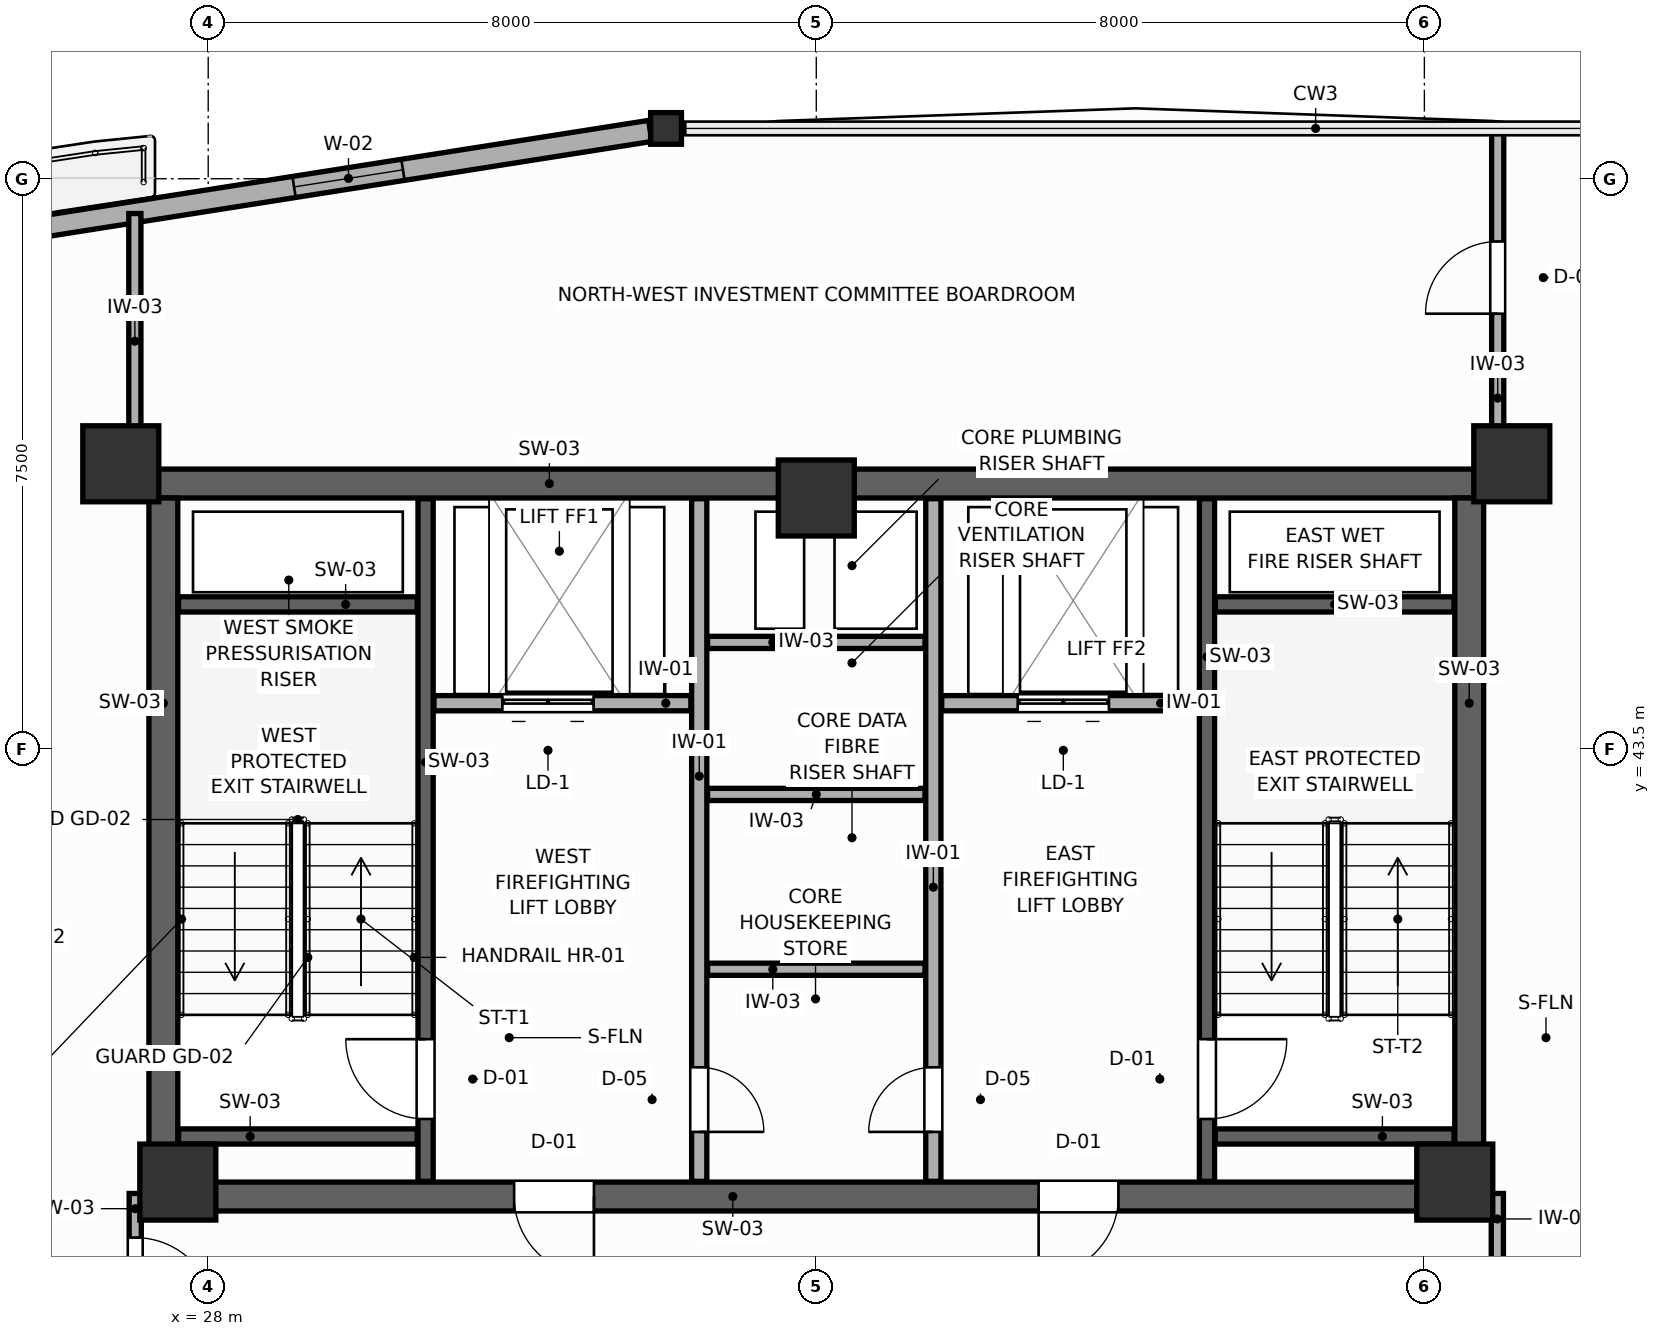
"""IFC4 building model, lengths in metres.
Left out: names, types, materials, properties, quantities, classifications, styles, units other than length and angle.
Written with IfcOpenShell. Run it as: python <this file> out.ifc"""

import sys

from ifc_helpers import new_model, si_unit, direction, frame, frame_2d, origin, origin_2d, place, context, subcontext, project, spatial, rectangle, i_section, extrude, source, transform, mapped, element, fill, save


model = new_model("IFC4")
c1 = context("Model", 3, precision=1e-05, world=origin(), true_north=direction((0.0, 1.0)))
c2 = subcontext(c1, "Body", "Model", "MODEL_VIEW")
j1 = project(units=[si_unit("LENGTHUNIT", "METRE"), si_unit("PLANEANGLEUNIT", "RADIAN")], contexts=[c1])
p1 = place(None, origin())
s1 = spatial("IfcSite", under=j1, at=p1, CompositionType="ELEMENT")
p2 = place(p1, origin())
s2 = spatial("IfcBuilding", under=s1, at=p2, CompositionType="ELEMENT")
p3 = place(p2, frame((0.0, 0.0, 205.8)))
s3 = spatial("IfcBuildingStorey", under=s2, at=p3, CompositionType="ELEMENT", Elevation=205.8)
p4 = place(p3, frame((27.22, 46.99, 0.0), z_axis=(0.0, 0.0, 1.0), x_axis=(1.0, 0.0, 0.0)))
e1 = element("IfcWall", 1, at=p4, inside=s3, PredefinedType="SHEAR", context=c2, shape_type="SweptSolid", body=[
    extrude(rectangle(XDim=17.56, YDim=0.38, at=frame_2d((8.78, 0.0))), origin(), (0.0, 0.0, 1.0), 3.6),
])
p5 = place(p3, frame((27.22, 37.61, 0.0), z_axis=(0.0, 0.0, 1.0), x_axis=(1.0, 0.0, 0.0)))
e2 = element("IfcWall", 2, at=p5, inside=s3, PredefinedType="SHEAR", context=c2, shape_type="SweptSolid", body=[
    extrude(rectangle(XDim=17.56, YDim=0.38, at=frame_2d((8.78, 0.0))), origin(), (0.0, 0.0, 1.0), 3.6),
])
p6 = place(p5, frame((4.805, 0.0, 0.0)))
e3 = element("IfcOpeningElement", 3, at=p6, cuts=e2, PredefinedType="OPENING", context=c2, shape_type="SweptSolid", body=[
    extrude(rectangle(XDim=1.05, YDim=2.1, at=frame_2d((0.525, 1.05))), frame((0.0, 0.2, 0.0), z_axis=(0.0, -1.0, 0.0), x_axis=(1.0, 0.0, 0.0)), (0.0, 0.0, 1.0), 0.4),
])
p7 = place(p5, frame((11.705, 0.0, 0.0)))
e4 = element("IfcOpeningElement", 4, at=p7, cuts=e2, PredefinedType="OPENING", context=c2, shape_type="SweptSolid", body=[
    extrude(rectangle(XDim=1.05, YDim=2.1, at=frame_2d((0.525, 1.05))), frame((0.0, 0.2, 0.0), z_axis=(0.0, -1.0, 0.0), x_axis=(1.0, 0.0, 0.0)), (0.0, 0.0, 1.0), 0.4),
])
for number, where, z_axis, x_axis in (
    (5, (27.41, 37.8, 0.0), (0.0, 0.0, 1.0), (0.0, 1.0, 0.0)),
    (6, (44.59, 37.8, 0.0), (0.0, 0.0, 1.0), (0.0, 1.0, 0.0)),
):
    element("IfcWall", number, at=place(p3, frame(where, z_axis=z_axis, x_axis=x_axis)), inside=s3, PredefinedType="SHEAR", context=c2, shape_type="SweptSolid", body=[
        extrude(rectangle(XDim=9.0, YDim=0.38, at=frame_2d((4.5, 0.0))), origin(), (0.0, 0.0, 1.0), 3.6),
    ])
m1 = source(origin(), c2, "Body", "SweptSolid", [
    extrude(rectangle(XDim=1.0, YDim=1.0, at=origin_2d()), origin(), (0.0, 0.0, 1.0), 3.6),
])
for number, where, z_axis, x_axis in (
    (7, (26.85, 47.25, 0.0), (0.0, 0.0, 1.0), (1.0, 0.0, 0.0)),
    (8, (45.15, 47.25, 0.0), (0.0, 0.0, 1.0), (1.0, 0.0, 0.0)),
    (9, (27.6, 37.8, 0.0), (0.0, 0.0, 1.0), (1.0, 0.0, 0.0)),
    (10, (44.4, 37.8, 0.0), (0.0, 0.0, 1.0), (1.0, 0.0, 0.0)),
    (11, (36.0, 46.8, 0.0), (0.0, 0.0, 1.0), (1.0, 0.0, 0.0)),
):
    element("IfcColumn", number, at=place(p3, frame(where, z_axis=z_axis, x_axis=x_axis)), inside=s3, PredefinedType="COLUMN", context=c2, shape_type="MappedRepresentation", body=[
        mapped(m1, transform((0.0, 0.0, 0.0), scale=1.0)),
    ])
m2 = source(origin(), c2, "Body", "SweptSolid", [
    extrude(i_section(OverallWidth=0.406, OverallDepth=0.416, WebThickness=0.027, FlangeThickness=0.044, FilletRadius=0.015, at=origin_2d()), origin(), (0.0, 0.0, 1.0), 3.6),
])
p8 = place(p3, frame((34.023, 51.662, 0.0), z_axis=(0.0, 0.0, 1.0), x_axis=(1.0, 0.0, 0.0)))
e12 = element("IfcColumn", 12, at=p8, inside=s3, PredefinedType="COLUMN", context=c2, shape_type="MappedRepresentation", body=[
    mapped(m2, transform((0.0, 0.0, 0.0), scale=1.0)),
])
p9 = place(p3, frame((33.815, 51.629, 0.0), z_axis=(0.0, 0.0, 1.0), x_axis=(-0.987848165878, -0.155422009936, 0.0)))
e13 = element("IfcWall", 13, at=p9, inside=s3, PredefinedType="SOLIDWALL", context=c2, shape_type="SweptSolid", body=[
    extrude(rectangle(XDim=13.823, YDim=0.28, at=frame_2d((6.912, 0.0))), origin(), (0.0, 0.0, 1.0), 2.96),
])
p10 = place(p9, frame((3.293, 0.0, 0.75)))
e14 = element("IfcOpeningElement", 14, at=p10, cuts=e13, PredefinedType="OPENING", context=c2, shape_type="SweptSolid", body=[
    extrude(rectangle(XDim=1.45, YDim=1.65, at=frame_2d((0.725, 0.825))), frame((0.0, 0.15, 0.0), z_axis=(0.0, -1.0, 0.0), x_axis=(1.0, 0.0, 0.0)), (0.0, 0.0, 1.0), 0.3),
])
p11 = place(p3, frame((30.86, 37.81, 0.0), z_axis=(0.0, 0.0, 1.0), x_axis=(0.0, 1.0, 0.0)))
e15 = element("IfcWall", 15, at=p11, inside=s3, PredefinedType="SHEAR", context=c2, shape_type="SweptSolid", body=[
    extrude(rectangle(XDim=8.98, YDim=0.2, at=frame_2d((4.49, 0.0))), origin(), (0.0, 0.0, 1.0), 3.6),
])
p12 = place(p11, frame((0.82, 0.0, 0.0)))
e16 = element("IfcOpeningElement", 16, at=p12, cuts=e15, PredefinedType="OPENING", context=c2, shape_type="SweptSolid", body=[
    extrude(rectangle(XDim=1.05, YDim=2.1, at=frame_2d((0.525, 1.05))), frame((0.0, 0.11, 0.0), z_axis=(0.0, -1.0, 0.0), x_axis=(1.0, 0.0, 0.0)), (0.0, 0.0, 1.0), 0.22),
])
for number, where, z_axis, x_axis in (
    (17, (27.61, 45.4, 0.0), (0.0, 0.0, 1.0), (1.0, 0.0, 0.0)),
    (18, (27.61, 38.4, 0.0), (0.0, 0.0, 1.0), (1.0, 0.0, 0.0)),
):
    element("IfcWall", number, at=place(p3, frame(where, z_axis=z_axis, x_axis=x_axis)), inside=s3, PredefinedType="SHEAR", context=c2, shape_type="SweptSolid", body=[
        extrude(rectangle(XDim=3.14, YDim=0.2, at=frame_2d((1.57, 0.0))), origin(), (0.0, 0.0, 1.0), 3.6),
    ])
p13 = place(p3, frame((41.14, 37.81, 0.0), z_axis=(0.0, 0.0, 1.0), x_axis=(0.0, 1.0, 0.0)))
e19 = element("IfcWall", 19, at=p13, inside=s3, PredefinedType="SHEAR", context=c2, shape_type="SweptSolid", body=[
    extrude(rectangle(XDim=8.98, YDim=0.2, at=frame_2d((4.49, 0.0))), origin(), (0.0, 0.0, 1.0), 3.6),
])
p14 = place(p13, frame((0.82, 0.0, 0.0)))
e20 = element("IfcOpeningElement", 20, at=p14, cuts=e19, PredefinedType="OPENING", context=c2, shape_type="SweptSolid", body=[
    extrude(rectangle(XDim=1.05, YDim=2.1, at=frame_2d((0.525, 1.05))), frame((0.0, 0.11, 0.0), z_axis=(0.0, -1.0, 0.0), x_axis=(1.0, 0.0, 0.0)), (0.0, 0.0, 1.0), 0.22),
])
for number, where, z_axis, x_axis in (
    (21, (41.25, 45.4, 0.0), (0.0, 0.0, 1.0), (1.0, 0.0, 0.0)),
    (22, (41.25, 38.4, 0.0), (0.0, 0.0, 1.0), (1.0, 0.0, 0.0)),
):
    element("IfcWall", number, at=place(p3, frame(where, z_axis=z_axis, x_axis=x_axis)), inside=s3, PredefinedType="SHEAR", context=c2, shape_type="SweptSolid", body=[
        extrude(rectangle(XDim=3.14, YDim=0.2, at=frame_2d((1.57, 0.0))), origin(), (0.0, 0.0, 1.0), 3.6),
    ])
p15 = place(p3, frame((30.97, 44.1, 0.0), z_axis=(0.0, 0.0, 1.0), x_axis=(1.0, 0.0, 0.0)))
e23 = element("IfcWall", 23, at=p15, inside=s3, PredefinedType="PARTITIONING", context=c2, shape_type="SweptSolid", body=[
    extrude(rectangle(XDim=3.38, YDim=0.2, at=frame_2d((1.69, 0.0))), origin(), (0.0, 0.0, 1.0), 3.41),
])
p16 = place(p15, frame((0.9, 0.0, 0.0)))
e24 = element("IfcOpeningElement", 24, at=p16, cuts=e23, PredefinedType="OPENING", context=c2, shape_type="SweptSolid", body=[
    extrude(rectangle(XDim=1.2, YDim=2.1, at=frame_2d((0.6, 1.05))), frame((0.0, 0.11, 0.0), z_axis=(0.0, -1.0, 0.0), x_axis=(1.0, 0.0, 0.0)), (0.0, 0.0, 1.0), 0.22),
])
p17 = place(p3, frame((37.65, 44.1, 0.0), z_axis=(0.0, 0.0, 1.0), x_axis=(1.0, 0.0, 0.0)))
e25 = element("IfcWall", 25, at=p17, inside=s3, PredefinedType="PARTITIONING", context=c2, shape_type="SweptSolid", body=[
    extrude(rectangle(XDim=3.38, YDim=0.2, at=frame_2d((1.69, 0.0))), origin(), (0.0, 0.0, 1.0), 3.41),
])
p18 = place(p17, frame((1.0, 0.0, 0.0)))
e26 = element("IfcOpeningElement", 26, at=p18, cuts=e25, PredefinedType="OPENING", context=c2, shape_type="SweptSolid", body=[
    extrude(rectangle(XDim=1.2, YDim=2.1, at=frame_2d((0.6, 1.05))), frame((0.0, 0.11, 0.0), z_axis=(0.0, -1.0, 0.0), x_axis=(1.0, 0.0, 0.0)), (0.0, 0.0, 1.0), 0.22),
])
p19 = place(p3, frame((34.46, 37.81, 0.0), z_axis=(0.0, 0.0, 1.0), x_axis=(0.0, 1.0, 0.0)))
e27 = element("IfcWall", 27, at=p19, inside=s3, PredefinedType="PARTITIONING", context=c2, shape_type="SweptSolid", body=[
    extrude(rectangle(XDim=8.98, YDim=0.2, at=frame_2d((4.49, 0.0))), origin(), (0.0, 0.0, 1.0), 3.41),
])
p20 = place(p19, frame((0.65, 0.0, 0.0)))
e28 = element("IfcOpeningElement", 28, at=p20, cuts=e27, PredefinedType="OPENING", context=c2, shape_type="SweptSolid", body=[
    extrude(rectangle(XDim=0.85, YDim=2.05, at=frame_2d((0.425, 1.025))), frame((0.0, 0.11, 0.0), z_axis=(0.0, -1.0, 0.0), x_axis=(1.0, 0.0, 0.0)), (0.0, 0.0, 1.0), 0.22),
])
p21 = place(p3, frame((37.54, 37.81, 0.0), z_axis=(0.0, 0.0, 1.0), x_axis=(0.0, 1.0, 0.0)))
e29 = element("IfcWall", 29, at=p21, inside=s3, PredefinedType="PARTITIONING", context=c2, shape_type="SweptSolid", body=[
    extrude(rectangle(XDim=8.98, YDim=0.2, at=frame_2d((4.49, 0.0))), origin(), (0.0, 0.0, 1.0), 3.41),
])
p22 = place(p21, frame((0.65, 0.0, 0.0)))
e30 = element("IfcOpeningElement", 30, at=p22, cuts=e29, PredefinedType="OPENING", context=c2, shape_type="SweptSolid", body=[
    extrude(rectangle(XDim=0.85, YDim=2.05, at=frame_2d((0.425, 1.025))), frame((0.0, 0.11, 0.0), z_axis=(0.0, -1.0, 0.0), x_axis=(1.0, 0.0, 0.0)), (0.0, 0.0, 1.0), 0.22),
])
for number, where, z_axis, x_axis in (
    (31, (34.57, 40.6, 0.0), (0.0, 0.0, 1.0), (1.0, 0.0, 0.0)),
    (32, (34.57, 42.9, 0.0), (0.0, 0.0, 1.0), (1.0, 0.0, 0.0)),
    (33, (34.57, 44.9, 0.0), (0.0, 0.0, 1.0), (1.0, 0.0, 0.0)),
):
    element("IfcWall", number, at=place(p3, frame(where, z_axis=z_axis, x_axis=x_axis)), inside=s3, PredefinedType="PARTITIONING", context=c2, shape_type="SweptSolid", body=[
        extrude(rectangle(XDim=2.86, YDim=0.16, at=frame_2d((1.43, 0.0))), origin(), (0.0, 0.0, 1.0), 3.41),
    ])
p23 = place(p3, frame((27.04, 35.54, 0.0), z_axis=(0.0, 0.0, 1.0), x_axis=(0.0, 1.0, 0.0)))
e34 = element("IfcWall", 34, at=p23, inside=s3, PredefinedType="PARTITIONING", context=c2, shape_type="SweptSolid", body=[
    extrude(rectangle(XDim=2.11, YDim=0.16, at=frame_2d((1.055, 0.0))), origin(), (0.0, 0.0, 1.0), 3.41),
])
p24 = place(p23, frame((0.48, 0.0, 0.0)))
e35 = element("IfcOpeningElement", 35, at=p24, cuts=e34, PredefinedType="OPENING", context=c2, shape_type="SweptSolid", body=[
    extrude(rectangle(XDim=1.05, YDim=2.1, at=frame_2d((0.525, 1.05))), frame((0.0, 0.09, 0.0), z_axis=(0.0, -1.0, 0.0), x_axis=(1.0, 0.0, 0.0)), (0.0, 0.0, 1.0), 0.18),
])
p25 = place(p3, frame((44.96, 35.0, 0.0), z_axis=(0.0, 0.0, 1.0), x_axis=(0.0, 1.0, 0.0)))
e36 = element("IfcWall", 36, at=p25, inside=s3, PredefinedType="PARTITIONING", context=c2, shape_type="SweptSolid", body=[
    extrude(rectangle(XDim=2.65, YDim=0.16, at=frame_2d((1.325, 0.0))), origin(), (0.0, 0.0, 1.0), 3.41),
])
p26 = place(p25, frame((0.75, 0.0, 0.0)))
e37 = element("IfcOpeningElement", 37, at=p26, cuts=e36, PredefinedType="OPENING", context=c2, shape_type="SweptSolid", body=[
    extrude(rectangle(XDim=1.05, YDim=2.1, at=frame_2d((0.525, 1.05))), frame((0.0, 0.09, 0.0), z_axis=(0.0, -1.0, 0.0), x_axis=(1.0, 0.0, 0.0)), (0.0, 0.0, 1.0), 0.18),
])
p27 = place(p3, frame((44.965, 47.183, 0.0), z_axis=(0.0, 0.0, 1.0), x_axis=(0.0, 1.0, 0.0)))
e38 = element("IfcWall", 38, at=p27, inside=s3, PredefinedType="PARTITIONING", context=c2, shape_type="SweptSolid", body=[
    extrude(rectangle(XDim=4.458, YDim=0.16, at=frame_2d((2.229, 0.0))), origin(), (0.0, 0.0, 1.0), 3.41),
])
p28 = place(p27, frame((2.041, 0.0, 0.0)))
e39 = element("IfcOpeningElement", 39, at=p28, cuts=e38, PredefinedType="OPENING", context=c2, shape_type="SweptSolid", body=[
    extrude(rectangle(XDim=0.95, YDim=2.05, at=frame_2d((0.475, 1.025))), frame((0.0, 0.09, 0.0), z_axis=(0.0, -1.0, 0.0), x_axis=(1.0, 0.0, 0.0)), (0.0, 0.0, 1.0), 0.18),
])
p29 = place(p3, frame((27.035, 47.183, 0.0), z_axis=(0.0, 0.0, 1.0), x_axis=(0.0, 1.0, 0.0)))
e40 = element("IfcWall", 40, at=p29, inside=s3, PredefinedType="PARTITIONING", context=c2, shape_type="SweptSolid", body=[
    extrude(rectangle(XDim=3.359, YDim=0.16, at=frame_2d((1.68, 0.0))), origin(), (0.0, 0.0, 1.0), 3.41),
])
p30 = place(p10, origin())
e41 = element("IfcWindow", 41, at=p30, inside=s3, PartitioningType="SINGLE_PANEL", PredefinedType="WINDOW", context=c2, shape_type="SweptSolid", body=[
    extrude(rectangle(XDim=1.45, YDim=1.65, at=frame_2d((0.725, 0.825))), frame((0.0, 0.03, 0.0), z_axis=(0.0, -1.0, 0.0), x_axis=(1.0, 0.0, 0.0)), (0.0, 0.0, 1.0), 0.06),
])
fill(e14, e41)
p31 = place(p12, origin())
e42 = element("IfcDoor", 42, at=p31, inside=s3, OperationType="SINGLE_SWING_RIGHT", PredefinedType="DOOR", context=c2, shape_type="SweptSolid", body=[
    extrude(rectangle(XDim=1.05, YDim=2.1, at=frame_2d((0.525, 1.05))), frame((0.0, 0.025, 0.0), z_axis=(0.0, -1.0, 0.0), x_axis=(1.0, 0.0, 0.0)), (0.0, 0.0, 1.0), 0.05),
])
fill(e16, e42)
p32 = place(p14, frame((1.05, 0.0, 0.0), z_axis=(0.0, 0.0, 1.0), x_axis=(-1.0, 0.0, 0.0)))
e43 = element("IfcDoor", 43, at=p32, inside=s3, OperationType="SINGLE_SWING_LEFT", PredefinedType="DOOR", context=c2, shape_type="SweptSolid", body=[
    extrude(rectangle(XDim=1.05, YDim=2.1, at=frame_2d((0.525, 1.05))), frame((0.0, 0.025, 0.0), z_axis=(0.0, -1.0, 0.0), x_axis=(1.0, 0.0, 0.0)), (0.0, 0.0, 1.0), 0.05),
])
fill(e20, e43)
p33 = place(p16, origin())
e44 = element("IfcDoor", 44, at=p33, inside=s3, OperationType="DOUBLE_DOOR_SLIDING", PredefinedType="DOOR", context=c2, shape_type="SweptSolid", body=[
    extrude(rectangle(XDim=1.2, YDim=2.1, at=frame_2d((0.6, 1.05))), frame((0.0, 0.025, 0.0), z_axis=(0.0, -1.0, 0.0), x_axis=(1.0, 0.0, 0.0)), (0.0, 0.0, 1.0), 0.05),
])
fill(e24, e44)
p34 = place(p18, origin())
e45 = element("IfcDoor", 45, at=p34, inside=s3, OperationType="DOUBLE_DOOR_SLIDING", PredefinedType="DOOR", context=c2, shape_type="SweptSolid", body=[
    extrude(rectangle(XDim=1.2, YDim=2.1, at=frame_2d((0.6, 1.05))), frame((0.0, 0.025, 0.0), z_axis=(0.0, -1.0, 0.0), x_axis=(1.0, 0.0, 0.0)), (0.0, 0.0, 1.0), 0.05),
])
fill(e26, e45)
p35 = place(p20, frame((0.85, 0.0, 0.0), z_axis=(0.0, 0.0, 1.0), x_axis=(-1.0, 0.0, 0.0)))
e46 = element("IfcDoor", 46, at=p35, inside=s3, OperationType="SINGLE_SWING_RIGHT", PredefinedType="DOOR", context=c2, shape_type="SweptSolid", body=[
    extrude(rectangle(XDim=0.85, YDim=2.05, at=frame_2d((0.425, 1.025))), frame((0.0, 0.025, 0.0), z_axis=(0.0, -1.0, 0.0), x_axis=(1.0, 0.0, 0.0)), (0.0, 0.0, 1.0), 0.05),
])
fill(e28, e46)
p36 = place(p22, origin())
e47 = element("IfcDoor", 47, at=p36, inside=s3, OperationType="SINGLE_SWING_LEFT", PredefinedType="DOOR", context=c2, shape_type="SweptSolid", body=[
    extrude(rectangle(XDim=0.85, YDim=2.05, at=frame_2d((0.425, 1.025))), frame((0.0, 0.025, 0.0), z_axis=(0.0, -1.0, 0.0), x_axis=(1.0, 0.0, 0.0)), (0.0, 0.0, 1.0), 0.05),
])
fill(e30, e47)
p37 = place(p24, frame((1.05, 0.0, 0.0), z_axis=(0.0, 0.0, 1.0), x_axis=(-1.0, 0.0, 0.0)))
e48 = element("IfcDoor", 48, at=p37, inside=s3, OperationType="SINGLE_SWING_RIGHT", PredefinedType="DOOR", context=c2, shape_type="SweptSolid", body=[
    extrude(rectangle(XDim=1.05, YDim=2.1, at=frame_2d((0.525, 1.05))), frame((0.0, 0.025, 0.0), z_axis=(0.0, -1.0, 0.0), x_axis=(1.0, 0.0, 0.0)), (0.0, 0.0, 1.0), 0.05),
])
fill(e35, e48)
p38 = place(p28, origin())
e49 = element("IfcDoor", 49, at=p38, inside=s3, OperationType="SINGLE_SWING_LEFT", PredefinedType="DOOR", context=c2, shape_type="SweptSolid", body=[
    extrude(rectangle(XDim=0.95, YDim=2.05, at=frame_2d((0.475, 1.025))), frame((0.0, 0.025, 0.0), z_axis=(0.0, -1.0, 0.0), x_axis=(1.0, 0.0, 0.0)), (0.0, 0.0, 1.0), 0.05),
])
fill(e39, e49)
p39 = place(p6, frame((1.05, 0.0, 0.0), z_axis=(0.0, 0.0, 1.0), x_axis=(-1.0, 0.0, 0.0)))
e50 = element("IfcDoor", 50, at=p39, inside=s3, OperationType="SINGLE_SWING_LEFT", PredefinedType="DOOR", context=c2, shape_type="SweptSolid", body=[
    extrude(rectangle(XDim=1.05, YDim=2.1, at=frame_2d((0.525, 1.05))), frame((0.0, 0.025, 0.0), z_axis=(0.0, -1.0, 0.0), x_axis=(1.0, 0.0, 0.0)), (0.0, 0.0, 1.0), 0.05),
])
fill(e3, e50)
p40 = place(p7, frame((1.05, 0.0, 0.0), z_axis=(0.0, 0.0, 1.0), x_axis=(-1.0, 0.0, 0.0)))
e51 = element("IfcDoor", 51, at=p40, inside=s3, OperationType="SINGLE_SWING_RIGHT", PredefinedType="DOOR", context=c2, shape_type="SweptSolid", body=[
    extrude(rectangle(XDim=1.05, YDim=2.1, at=frame_2d((0.525, 1.05))), frame((0.0, 0.025, 0.0), z_axis=(0.0, -1.0, 0.0), x_axis=(1.0, 0.0, 0.0)), (0.0, 0.0, 1.0), 0.05),
])
fill(e4, e51)
save(model, sys.argv[1])
